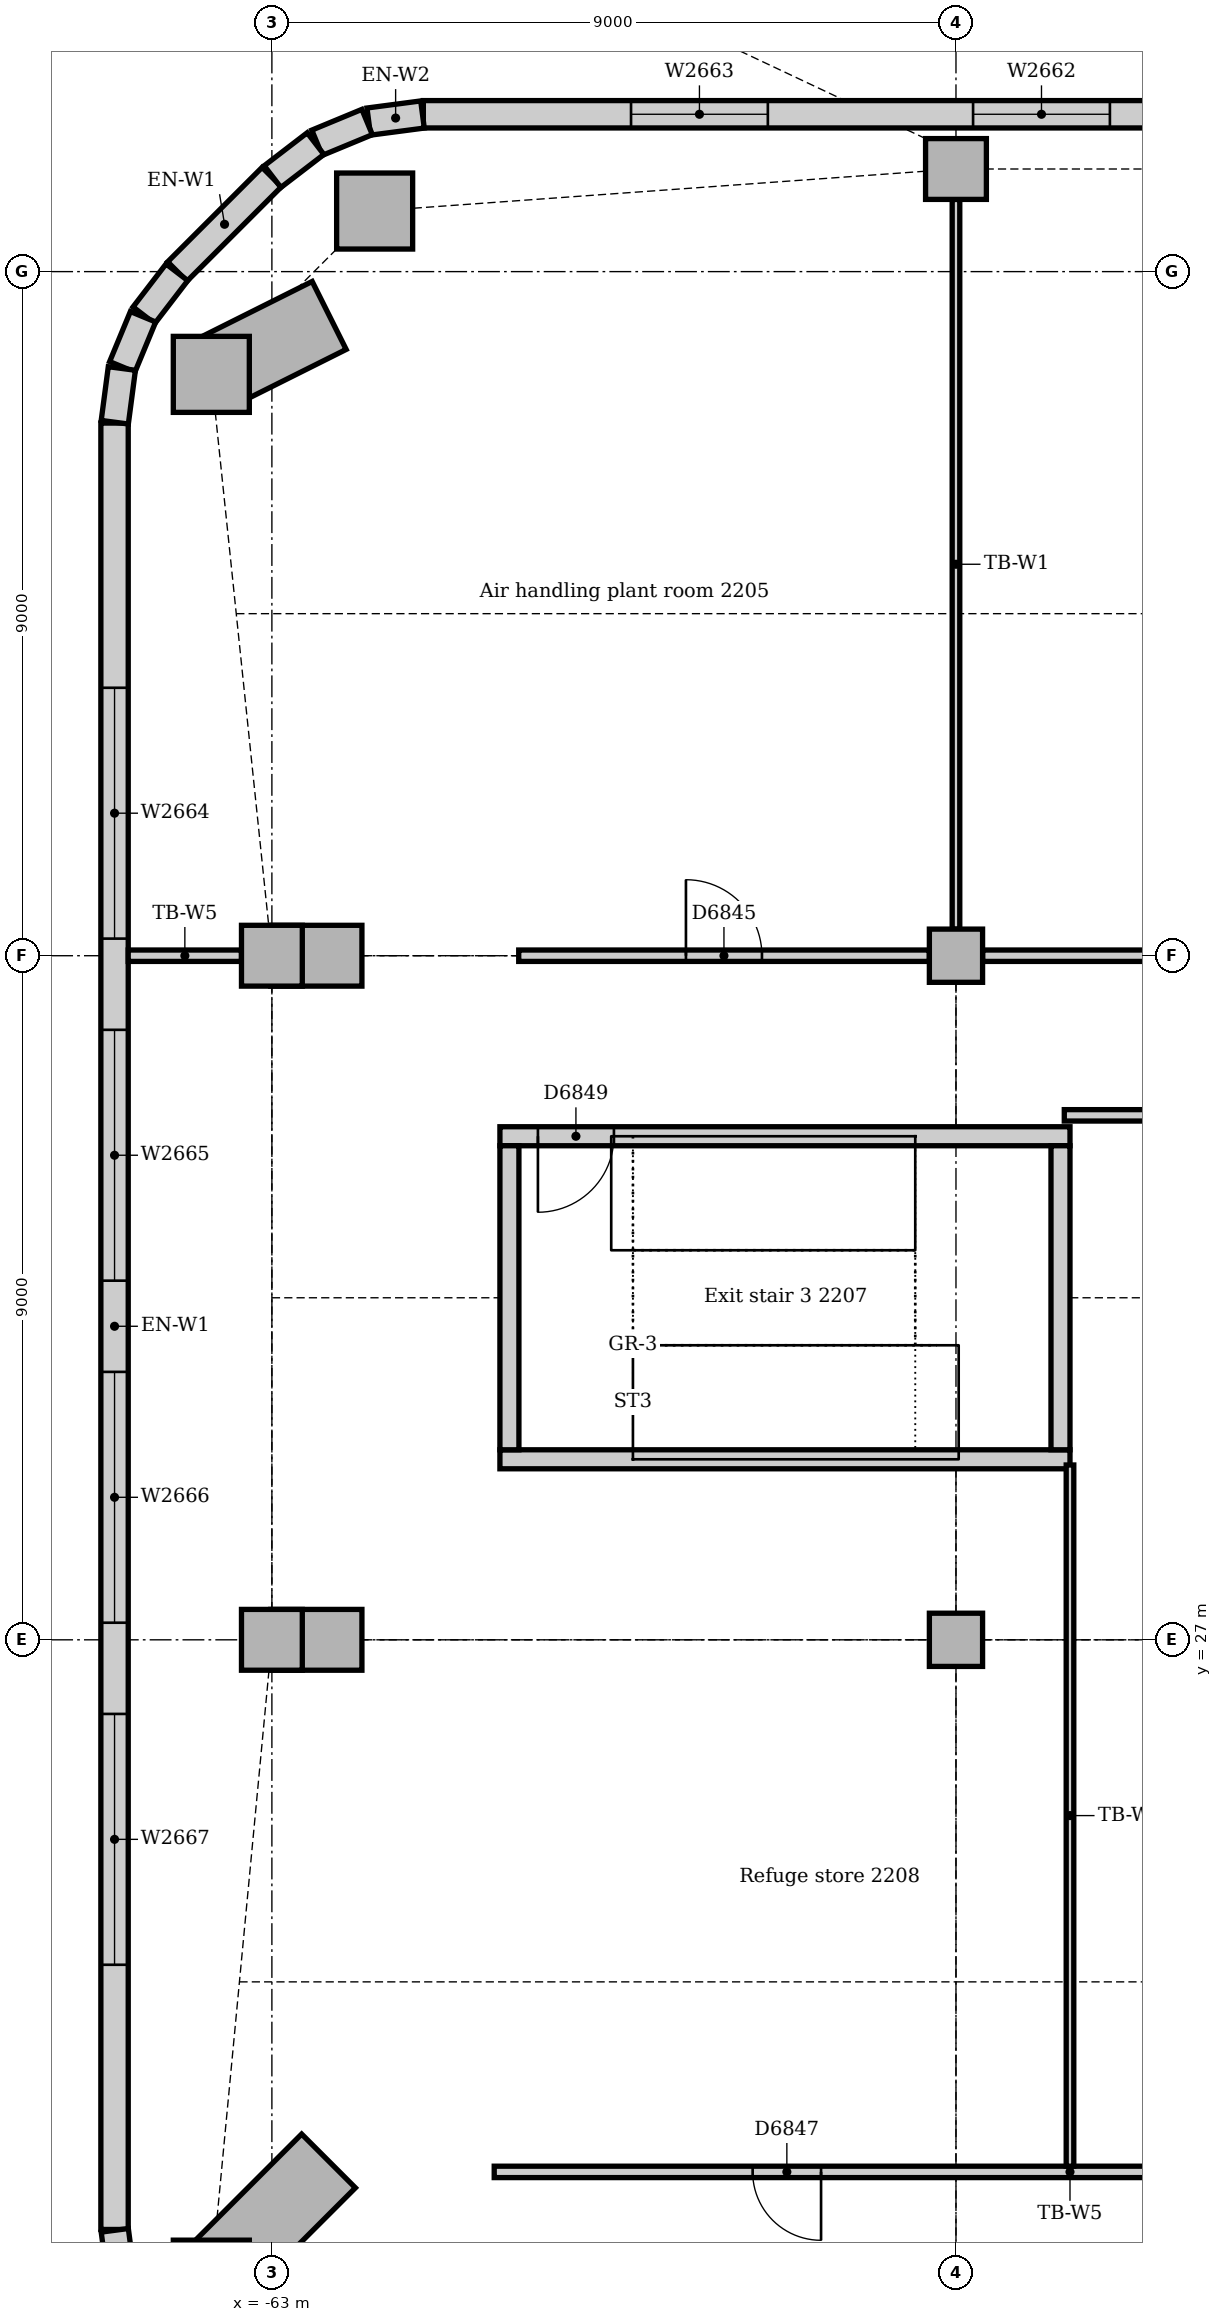
"""IFC4 building model, lengths in metres.
Left out: names, types, materials, properties, quantities, classifications, styles, units other than length and angle.
Written with IfcOpenShell. Run it as: python <this file> out.ifc"""

import sys

from ifc_helpers import new_model, si_unit, direction, frame, frame_2d, origin, origin_2d, place, context, subcontext, project, spatial, rectangle, extrude, element, fill, save


model = new_model("IFC4")
c1 = context("Model", 3, precision=1e-05, world=origin(), true_north=direction((0.0, 1.0)))
c2 = subcontext(c1, "Body", "Model", "MODEL_VIEW")
j1 = project(units=[si_unit("LENGTHUNIT", "METRE"), si_unit("PLANEANGLEUNIT", "RADIAN")], contexts=[c1])
p1 = place(None, origin())
s1 = spatial("IfcSite", under=j1, at=p1, CompositionType="ELEMENT")
p2 = place(p1, origin())
s2 = spatial("IfcBuilding", under=s1, at=p2, CompositionType="ELEMENT")
p3 = place(p2, frame((0.0, 0.0, 95.0)))
s3 = spatial("IfcBuildingStorey", under=s2, at=p3, CompositionType="ELEMENT", Elevation=95.0)
p4 = place(p3, frame((-60.0, 29.375, 0.0), z_axis=(0.0, 0.0, 1.0), x_axis=(1.0, 0.0, 0.0)))
e1 = element("IfcWall", 1, at=p4, inside=s3, PredefinedType="SOLIDWALL", context=c2, shape_type="SweptSolid", body=[
    extrude(rectangle(XDim=7.5, YDim=0.25, at=frame_2d((3.75, 0.0))), origin(), (0.0, 0.0, 1.0), 5.0),
])
p5 = place(p3, frame((-52.5, 33.625, 0.0), z_axis=(0.0, 0.0, 1.0), x_axis=(-1.0, 0.0, 0.0)))
e2 = element("IfcWall", 2, at=p5, inside=s3, PredefinedType="SOLIDWALL", context=c2, shape_type="SweptSolid", body=[
    extrude(rectangle(XDim=7.5, YDim=0.25, at=frame_2d((3.75, 0.0))), origin(), (0.0, 0.0, 1.0), 5.0),
])
p6 = place(p5, frame((6.0, 0.0, 0.0)))
e3 = element("IfcOpeningElement", 3, at=p6, cuts=e2, PredefinedType="OPENING", context=c2, shape_type="SweptSolid", body=[
    extrude(rectangle(XDim=1.0, YDim=2.1, at=frame_2d((0.5, 1.05))), frame((0.0, 0.135, 0.0), z_axis=(0.0, -1.0, 0.0), x_axis=(1.0, 0.0, 0.0)), (0.0, 0.0, 1.0), 0.27),
])
for number, where, z_axis, x_axis in (
    (4, (-52.625, 29.5, 0.0), (0.0, 0.0, 1.0), (0.0, 1.0, 0.0)),
    (5, (-59.875, 33.5, 0.0), (0.0, 0.0, 1.0), (0.0, -1.0, 0.0)),
):
    element("IfcWall", number, at=place(p3, frame(where, z_axis=z_axis, x_axis=x_axis)), inside=s3, PredefinedType="SOLIDWALL", context=c2, shape_type="SweptSolid", body=[
        extrude(rectangle(XDim=4.0, YDim=0.25, at=frame_2d((2.0, 0.0))), origin(), (0.0, 0.0, 1.0), 5.0),
    ])
for number, where, z_axis, x_axis in (
    (6, (-61.648, 45.797, 0.0), (0.0, 0.0, 1.0), (1.0, 0.0, 0.0)),
    (7, (-63.797, 43.648, 0.0), (0.0, 0.0, 1.0), (1.0, 0.0, 0.0)),
    (8, (-63.797, 18.602, 0.0), (0.0, 0.0, 1.0), (1.0, 0.0, 0.0)),
):
    element("IfcColumn", number, at=place(p3, frame(where, z_axis=z_axis, x_axis=x_axis)), inside=s3, PredefinedType="COLUMN", context=c2, shape_type="SweptSolid", body=[
        extrude(rectangle(XDim=1.0, YDim=1.0, at=origin_2d()), origin(), (0.0, 0.0, 1.0), 4.85),
    ])
for number, where, z_axis, x_axis in (
    (9, (-54.0, 46.35, 0.0), (0.0, 0.0, 1.0), (1.0, 0.0, 0.0)),
    (10, (-63.0, 27.0, 0.0), (0.0, 0.0, 1.0), (1.0, 0.0, 0.0)),
    (11, (-63.0, 36.0, 0.0), (0.0, 0.0, 1.0), (1.0, 0.0, 0.0)),
):
    element("IfcColumn", number, at=place(p3, frame(where, z_axis=z_axis, x_axis=x_axis)), inside=s3, PredefinedType="COLUMN", context=c2, shape_type="SweptSolid", body=[
        extrude(rectangle(XDim=0.8, YDim=0.8, at=origin_2d()), origin(), (0.0, 0.0, 1.0), 4.85),
    ])
for number, where, z_axis, x_axis in (
    (12, (-54.0, 27.0, 0.0), (0.0, 0.0, 1.0), (1.0, 0.0, 0.0)),
    (13, (-54.0, 36.0, 0.0), (0.0, 0.0, 1.0), (1.0, 0.0, 0.0)),
):
    element("IfcColumn", number, at=place(p3, frame(where, z_axis=z_axis, x_axis=x_axis)), inside=s3, PredefinedType="COLUMN", context=c2, shape_type="SweptSolid", body=[
        extrude(rectangle(XDim=0.7, YDim=0.7, at=origin_2d()), origin(), (0.0, 0.0, 1.0), 4.85),
    ])
p7 = place(p3, frame((-31.243, 47.07, 0.0), z_axis=(0.0, 0.0, 1.0), x_axis=(-1.0, 0.0, 0.0)))
e14 = element("IfcWall", 14, at=p7, inside=s3, PredefinedType="STANDARD", context=c2, shape_type="SweptSolid", body=[
    extrude(rectangle(XDim=29.765, YDim=0.36, at=frame_2d((14.882, 0.0))), origin(), (0.0, 0.0, 1.0), 3.25),
])
p8 = place(p7, frame((2.732, 0.0, 1.2)))
e15 = element("IfcOpeningElement", 15, at=p8, cuts=e14, PredefinedType="OPENING", context=c2, shape_type="SweptSolid", body=[
    extrude(rectangle(XDim=1.8, YDim=1.2, at=frame_2d((0.9, 0.6))), frame((0.0, 0.19, 0.0), z_axis=(0.0, -1.0, 0.0), x_axis=(1.0, 0.0, 0.0)), (0.0, 0.0, 1.0), 0.38),
])
p9 = place(p7, frame((7.232, 0.0, 1.2)))
e16 = element("IfcOpeningElement", 16, at=p9, cuts=e14, PredefinedType="OPENING", context=c2, shape_type="SweptSolid", body=[
    extrude(rectangle(XDim=1.8, YDim=1.2, at=frame_2d((0.9, 0.6))), frame((0.0, 0.19, 0.0), z_axis=(0.0, -1.0, 0.0), x_axis=(1.0, 0.0, 0.0)), (0.0, 0.0, 1.0), 0.38),
])
p10 = place(p7, frame((11.732, 0.0, 1.2)))
e17 = element("IfcOpeningElement", 17, at=p10, cuts=e14, PredefinedType="OPENING", context=c2, shape_type="SweptSolid", body=[
    extrude(rectangle(XDim=1.8, YDim=1.2, at=frame_2d((0.9, 0.6))), frame((0.0, 0.19, 0.0), z_axis=(0.0, -1.0, 0.0), x_axis=(1.0, 0.0, 0.0)), (0.0, 0.0, 1.0), 0.38),
])
p11 = place(p7, frame((16.232, 0.0, 1.2)))
e18 = element("IfcOpeningElement", 18, at=p11, cuts=e14, PredefinedType="OPENING", context=c2, shape_type="SweptSolid", body=[
    extrude(rectangle(XDim=1.8, YDim=1.2, at=frame_2d((0.9, 0.6))), frame((0.0, 0.19, 0.0), z_axis=(0.0, -1.0, 0.0), x_axis=(1.0, 0.0, 0.0)), (0.0, 0.0, 1.0), 0.38),
])
p12 = place(p7, frame((20.732, 0.0, 1.2)))
e19 = element("IfcOpeningElement", 19, at=p12, cuts=e14, PredefinedType="OPENING", context=c2, shape_type="SweptSolid", body=[
    extrude(rectangle(XDim=1.8, YDim=1.2, at=frame_2d((0.9, 0.6))), frame((0.0, 0.19, 0.0), z_axis=(0.0, -1.0, 0.0), x_axis=(1.0, 0.0, 0.0)), (0.0, 0.0, 1.0), 0.38),
])
p13 = place(p7, frame((25.232, 0.0, 1.2)))
e20 = element("IfcOpeningElement", 20, at=p13, cuts=e14, PredefinedType="OPENING", context=c2, shape_type="SweptSolid", body=[
    extrude(rectangle(XDim=1.8, YDim=1.2, at=frame_2d((0.9, 0.6))), frame((0.0, 0.19, 0.0), z_axis=(0.0, -1.0, 0.0), x_axis=(1.0, 0.0, 0.0)), (0.0, 0.0, 1.0), 0.38),
])
p14 = place(p3, frame((-63.001, 46.244, 0.0), z_axis=(0.0, 0.0, 1.0), x_axis=(-0.707106781187, -0.707106781187, 0.0)))
e21 = element("IfcWall", 21, at=p14, inside=s3, PredefinedType="STANDARD", context=c2, shape_type="SweptSolid", body=[
    extrude(rectangle(XDim=1.757, YDim=0.36, at=frame_2d((0.879, 0.0))), origin(), (0.0, 0.0, 1.0), 3.25),
])
p15 = place(p3, frame((-65.07, 43.007, 0.0), z_axis=(0.0, 0.0, 1.0), x_axis=(0.0, -1.0, 0.0)))
e22 = element("IfcWall", 22, at=p15, inside=s3, PredefinedType="STANDARD", context=c2, shape_type="SweptSolid", body=[
    extrude(rectangle(XDim=23.765, YDim=0.36, at=frame_2d((11.882, 0.0))), origin(), (0.0, 0.0, 1.0), 4.85),
])
p16 = place(p15, frame((3.482, 0.0, 0.9)))
e23 = element("IfcOpeningElement", 23, at=p16, cuts=e22, PredefinedType="OPENING", context=c2, shape_type="SweptSolid", body=[
    extrude(rectangle(XDim=3.3, YDim=2.2, at=frame_2d((1.65, 1.1))), frame((0.0, 0.19, 0.0), z_axis=(0.0, -1.0, 0.0), x_axis=(1.0, 0.0, 0.0)), (0.0, 0.0, 1.0), 0.38),
])
p17 = place(p15, frame((7.982, 0.0, 0.9)))
e24 = element("IfcOpeningElement", 24, at=p17, cuts=e22, PredefinedType="OPENING", context=c2, shape_type="SweptSolid", body=[
    extrude(rectangle(XDim=3.3, YDim=2.2, at=frame_2d((1.65, 1.1))), frame((0.0, 0.19, 0.0), z_axis=(0.0, -1.0, 0.0), x_axis=(1.0, 0.0, 0.0)), (0.0, 0.0, 1.0), 0.38),
])
p18 = place(p15, frame((12.482, 0.0, 0.9)))
e25 = element("IfcOpeningElement", 25, at=p18, cuts=e22, PredefinedType="OPENING", context=c2, shape_type="SweptSolid", body=[
    extrude(rectangle(XDim=3.3, YDim=2.2, at=frame_2d((1.65, 1.1))), frame((0.0, 0.19, 0.0), z_axis=(0.0, -1.0, 0.0), x_axis=(1.0, 0.0, 0.0)), (0.0, 0.0, 1.0), 0.38),
])
p19 = place(p15, frame((16.982, 0.0, 0.9)))
e26 = element("IfcOpeningElement", 26, at=p19, cuts=e22, PredefinedType="OPENING", context=c2, shape_type="SweptSolid", body=[
    extrude(rectangle(XDim=3.3, YDim=2.2, at=frame_2d((1.65, 1.1))), frame((0.0, 0.19, 0.0), z_axis=(0.0, -1.0, 0.0), x_axis=(1.0, 0.0, 0.0)), (0.0, 0.0, 1.0), 0.38),
])
for number, where, z_axis, x_axis in (
    (27, (-61.019, 47.067, 0.0), (0.0, 0.0, 1.0), (-0.991, -0.131, 0.0)),
    (28, (-61.747, 46.968, 0.0), (0.0, 0.0, 1.0), (-0.924, -0.383, 0.0)),
):
    element("IfcWall", number, at=place(p3, frame(where, z_axis=z_axis, x_axis=x_axis)), inside=s3, PredefinedType="STANDARD", context=c2, shape_type="SweptSolid", body=[
        extrude(rectangle(XDim=0.713, YDim=0.36, at=frame_2d((0.356, 0.0))), origin(), (0.0, 0.0, 1.0), 3.25),
    ])
for number, where, z_axis, x_axis in (
    (29, (-62.425, 46.684, 0.0), (0.0, 0.0, 1.0), (-0.793, -0.609, 0.0)),
    (30, (-64.25, 44.991, 0.0), (0.0, 0.0, 1.0), (-0.609, -0.793, 0.0)),
):
    element("IfcWall", number, at=place(p3, frame(where, z_axis=z_axis, x_axis=x_axis)), inside=s3, PredefinedType="STANDARD", context=c2, shape_type="SweptSolid", body=[
        extrude(rectangle(XDim=0.713, YDim=0.36, at=frame_2d((0.357, 0.0))), origin(), (0.0, 0.0, 1.0), 3.25),
    ])
for number, where, z_axis, x_axis in (
    (31, (-64.695, 44.406, 0.0), (0.0, 0.0, 1.0), (-0.383, -0.924, 0.0)),
    (32, (-64.974, 43.726, 0.0), (0.0, 0.0, 1.0), (-0.131, -0.991, 0.0)),
):
    element("IfcWall", number, at=place(p3, frame(where, z_axis=z_axis, x_axis=x_axis)), inside=s3, PredefinedType="STANDARD", context=c2, shape_type="SweptSolid", body=[
        extrude(rectangle(XDim=0.713, YDim=0.36, at=frame_2d((0.356, 0.0))), origin(), (0.0, 0.0, 1.0), 3.25),
    ])
p20 = place(p3, frame((-65.067, 19.231, 0.0), z_axis=(0.0, 0.0, 1.0), x_axis=(0.13055608231, -0.99144092581, 0.0)))
e33 = element("IfcWall", 33, at=p20, inside=s3, PredefinedType="STANDARD", context=c2, shape_type="SweptSolid", body=[
    extrude(rectangle(XDim=0.713, YDim=0.36, at=frame_2d((0.356, 0.0))), origin(), (0.0, 0.0, 1.0), 4.85),
])
p21 = place(p3, frame((-53.65, 36.0, 0.0), z_axis=(0.0, 0.0, 1.0), x_axis=(1.0, 0.0, 0.0)))
e34 = element("IfcWall", 34, at=p21, inside=s3, PredefinedType="PARTITIONING", context=c2, shape_type="SweptSolid", body=[
    extrude(rectangle(XDim=8.3, YDim=0.15, at=frame_2d((4.15, 0.0))), origin(), (0.0, 0.0, 1.0), 4.262),
])
p22 = place(p21, frame((3.65, 0.0, 0.0)))
e35 = element("IfcOpeningElement", 35, at=p22, cuts=e34, PredefinedType="OPENING", context=c2, shape_type="SweptSolid", body=[
    extrude(rectangle(XDim=1.0, YDim=2.1, at=frame_2d((0.5, 1.05))), frame((0.0, 0.085, 0.0), z_axis=(0.0, -1.0, 0.0), x_axis=(1.0, 0.0, 0.0)), (0.0, 0.0, 1.0), 0.17),
])
p23 = place(p3, frame((-59.753, 36.0, 0.0), z_axis=(0.0, 0.0, 1.0), x_axis=(1.0, 0.0, 0.0)))
e36 = element("IfcWall", 36, at=p23, inside=s3, PredefinedType="PARTITIONING", context=c2, shape_type="SweptSolid", body=[
    extrude(rectangle(XDim=5.403, YDim=0.15, at=frame_2d((2.701, 0.0))), origin(), (0.0, 0.0, 1.0), 4.35),
])
p24 = place(p23, frame((2.2, 0.0, 0.0)))
e37 = element("IfcOpeningElement", 37, at=p24, cuts=e36, PredefinedType="OPENING", context=c2, shape_type="SweptSolid", body=[
    extrude(rectangle(XDim=1.0, YDim=2.1, at=frame_2d((0.5, 1.05))), frame((0.0, 0.085, 0.0), z_axis=(0.0, -1.0, 0.0), x_axis=(1.0, 0.0, 0.0)), (0.0, 0.0, 1.0), 0.17),
])
p25 = place(p3, frame((-64.89, 36.0, 0.0), z_axis=(0.0, 0.0, 1.0), x_axis=(1.0, 0.0, 0.0)))
e38 = element("IfcWall", 38, at=p25, inside=s3, PredefinedType="PARTITIONING", context=c2, shape_type="SweptSolid", body=[
    extrude(rectangle(XDim=1.49, YDim=0.15, at=frame_2d((0.745, 0.0))), origin(), (0.0, 0.0, 1.0), 4.85),
])
p26 = place(p3, frame((-60.075, 20.0, 0.0), z_axis=(0.0, 0.0, 1.0), x_axis=(1.0, 0.0, 0.0)))
e39 = element("IfcWall", 39, at=p26, inside=s3, PredefinedType="PARTITIONING", context=c2, shape_type="SweptSolid", body=[
    extrude(rectangle(XDim=15.15, YDim=0.15, at=frame_2d((7.575, 0.0))), origin(), (0.0, 0.0, 1.0), 4.85),
])
p27 = place(p26, frame((3.4, 0.0, 0.0)))
e40 = element("IfcOpeningElement", 40, at=p27, cuts=e39, PredefinedType="OPENING", context=c2, shape_type="SweptSolid", body=[
    extrude(rectangle(XDim=0.9, YDim=2.1, at=frame_2d((0.45, 1.05))), frame((0.0, 0.085, 0.0), z_axis=(0.0, -1.0, 0.0), x_axis=(1.0, 0.0, 0.0)), (0.0, 0.0, 1.0), 0.17),
])
p28 = place(p3, frame((-52.575, 33.9, 0.0), z_axis=(0.0, 0.0, 1.0), x_axis=(1.0, 0.0, 0.0)))
e41 = element("IfcWall", 41, at=p28, inside=s3, PredefinedType="PARTITIONING", context=c2, shape_type="SweptSolid", body=[
    extrude(rectangle(XDim=7.5, YDim=0.15, at=frame_2d((3.75, 0.0))), origin(), (0.0, 0.0, 1.0), 4.85),
])
p29 = place(p3, frame((-54.0, 36.35, 0.0), z_axis=(0.0, 0.0, 1.0), x_axis=(0.0, 1.0, 0.0)))
e42 = element("IfcWall", 42, at=p29, inside=s3, PredefinedType="PARTITIONING", context=c2, shape_type="SweptSolid", body=[
    extrude(rectangle(XDim=9.6, YDim=0.1, at=frame_2d((4.8, 0.0))), origin(), (0.0, 0.0, 1.0), 4.362),
])
p30 = place(p3, frame((-52.5, 20.075, 0.0), z_axis=(0.0, 0.0, 1.0), x_axis=(0.0, 1.0, 0.0)))
e43 = element("IfcWall", 43, at=p30, inside=s3, PredefinedType="PARTITIONING", context=c2, shape_type="SweptSolid", body=[
    extrude(rectangle(XDim=9.225, YDim=0.1, at=frame_2d((4.612, 0.0))), origin(), (0.0, 0.0, 1.0), 4.85),
])
p31 = place(p12, origin())
e44 = element("IfcWindow", 44, at=p31, inside=s3, PartitioningType="SINGLE_PANEL", PredefinedType="WINDOW", context=c2, shape_type="SweptSolid", body=[
    extrude(rectangle(XDim=1.8, YDim=1.2, at=frame_2d((0.9, 0.6))), frame((0.0, 0.13, 0.0), z_axis=(0.0, -1.0, 0.0), x_axis=(1.0, 0.0, 0.0)), (0.0, 0.0, 1.0), 0.06),
])
fill(e19, e44)
p32 = place(p13, origin())
e45 = element("IfcWindow", 45, at=p32, inside=s3, PartitioningType="SINGLE_PANEL", PredefinedType="WINDOW", context=c2, shape_type="SweptSolid", body=[
    extrude(rectangle(XDim=1.8, YDim=1.2, at=frame_2d((0.9, 0.6))), frame((0.0, 0.13, 0.0), z_axis=(0.0, -1.0, 0.0), x_axis=(1.0, 0.0, 0.0)), (0.0, 0.0, 1.0), 0.06),
])
fill(e20, e45)
p33 = place(p16, origin())
e46 = element("IfcWindow", 46, at=p33, inside=s3, PartitioningType="SINGLE_PANEL", PredefinedType="WINDOW", context=c2, shape_type="SweptSolid", body=[
    extrude(rectangle(XDim=3.3, YDim=2.2, at=frame_2d((1.65, 1.1))), frame((0.0, 0.13, 0.0), z_axis=(0.0, -1.0, 0.0), x_axis=(1.0, 0.0, 0.0)), (0.0, 0.0, 1.0), 0.06),
])
fill(e23, e46)
p34 = place(p17, origin())
e47 = element("IfcWindow", 47, at=p34, inside=s3, PartitioningType="SINGLE_PANEL", PredefinedType="WINDOW", context=c2, shape_type="SweptSolid", body=[
    extrude(rectangle(XDim=3.3, YDim=2.2, at=frame_2d((1.65, 1.1))), frame((0.0, 0.13, 0.0), z_axis=(0.0, -1.0, 0.0), x_axis=(1.0, 0.0, 0.0)), (0.0, 0.0, 1.0), 0.06),
])
fill(e24, e47)
p35 = place(p18, origin())
e48 = element("IfcWindow", 48, at=p35, inside=s3, PartitioningType="SINGLE_PANEL", PredefinedType="WINDOW", context=c2, shape_type="SweptSolid", body=[
    extrude(rectangle(XDim=3.3, YDim=2.2, at=frame_2d((1.65, 1.1))), frame((0.0, 0.13, 0.0), z_axis=(0.0, -1.0, 0.0), x_axis=(1.0, 0.0, 0.0)), (0.0, 0.0, 1.0), 0.06),
])
fill(e25, e48)
p36 = place(p19, origin())
e49 = element("IfcWindow", 49, at=p36, inside=s3, PartitioningType="SINGLE_PANEL", PredefinedType="WINDOW", context=c2, shape_type="SweptSolid", body=[
    extrude(rectangle(XDim=3.3, YDim=2.2, at=frame_2d((1.65, 1.1))), frame((0.0, 0.13, 0.0), z_axis=(0.0, -1.0, 0.0), x_axis=(1.0, 0.0, 0.0)), (0.0, 0.0, 1.0), 0.06),
])
fill(e26, e49)
p37 = place(p24, origin())
e50 = element("IfcDoor", 50, at=p37, inside=s3, OperationType="SINGLE_SWING_LEFT", PredefinedType="DOOR", context=c2, shape_type="SweptSolid", body=[
    extrude(rectangle(XDim=1.0, YDim=2.1, at=frame_2d((0.5, 1.05))), frame((0.0, 0.025, 0.0), z_axis=(0.0, -1.0, 0.0), x_axis=(1.0, 0.0, 0.0)), (0.0, 0.0, 1.0), 0.05),
])
fill(e37, e50)
p38 = place(p27, frame((0.9, 0.0, 0.0), z_axis=(0.0, 0.0, 1.0), x_axis=(-1.0, 0.0, 0.0)))
e51 = element("IfcDoor", 51, at=p38, inside=s3, OperationType="SINGLE_SWING_LEFT", PredefinedType="DOOR", context=c2, shape_type="SweptSolid", body=[
    extrude(rectangle(XDim=0.9, YDim=2.1, at=frame_2d((0.45, 1.05))), frame((0.0, 0.025, 0.0), z_axis=(0.0, -1.0, 0.0), x_axis=(1.0, 0.0, 0.0)), (0.0, 0.0, 1.0), 0.05),
])
fill(e40, e51)
p39 = place(p6, origin())
e52 = element("IfcDoor", 52, at=p39, inside=s3, OperationType="SINGLE_SWING_RIGHT", PredefinedType="DOOR", context=c2, shape_type="SweptSolid", body=[
    extrude(rectangle(XDim=1.0, YDim=2.1, at=frame_2d((0.5, 1.05))), frame((0.0, 0.025, 0.0), z_axis=(0.0, -1.0, 0.0), x_axis=(1.0, 0.0, 0.0)), (0.0, 0.0, 1.0), 0.05),
])
fill(e3, e52)
save(model, sys.argv[1])
